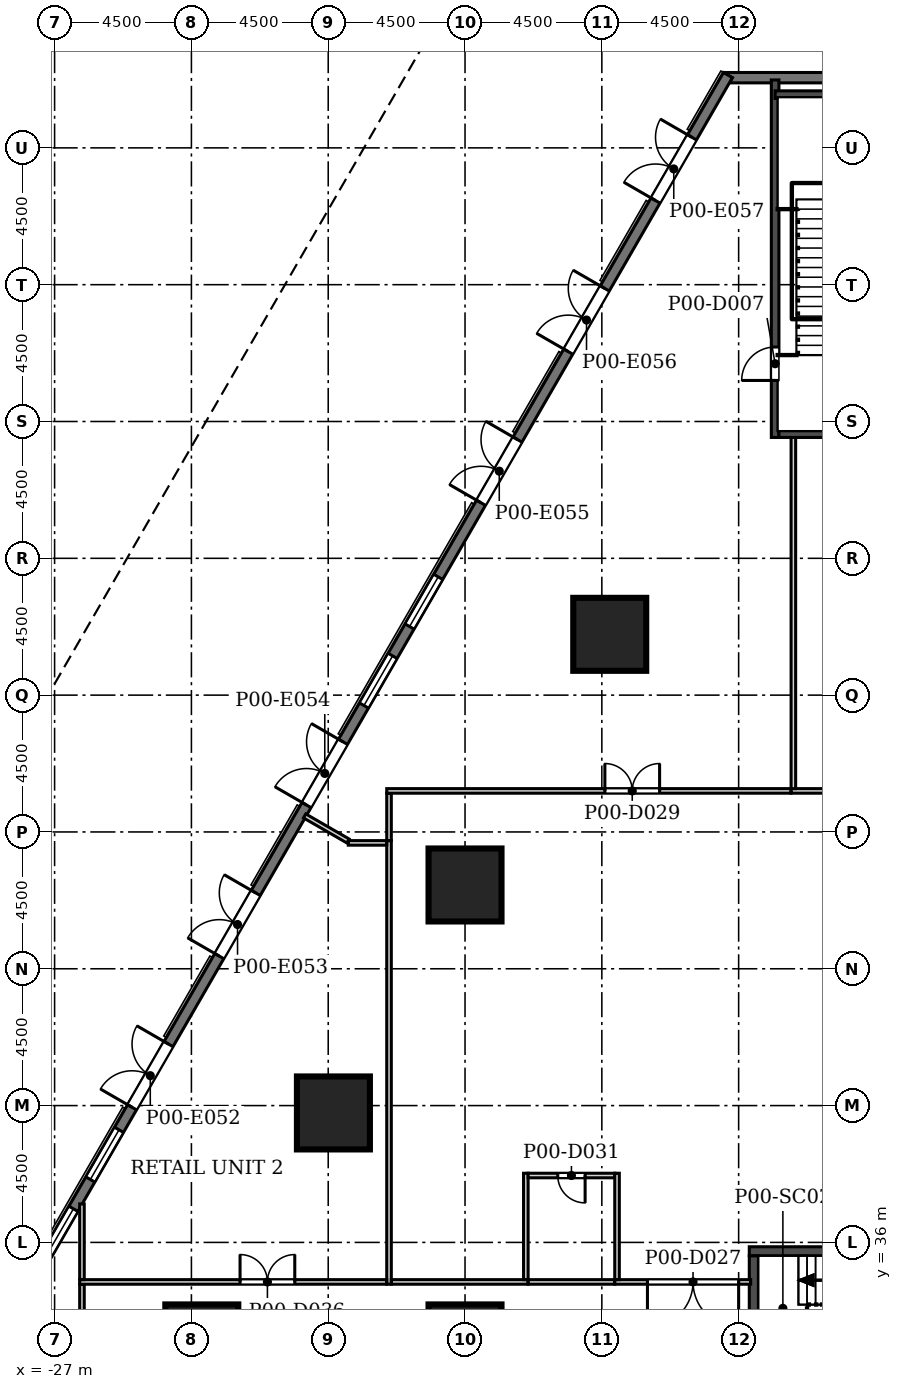
"""IFC4 building model, lengths in metres.
Left out: names, types, materials, properties, quantities, classifications, styles, units other than length and angle.
Written with IfcOpenShell. Run it as: python <this file> out.ifc"""

import sys

from ifc_helpers import new_model, si_unit, direction, frame, frame_2d, origin, origin_2d, place, context, subcontext, project, spatial, polyline, rectangle, outline, extrude, element, fill, save


model = new_model("IFC4")
c1 = context("Model", 3, precision=1e-05, world=origin(), true_north=direction((0.0, 1.0)))
c2 = subcontext(c1, "Body", "Model", "MODEL_VIEW")
j1 = project(units=[si_unit("LENGTHUNIT", "METRE"), si_unit("PLANEANGLEUNIT", "RADIAN")], contexts=[c1])
p1 = place(None, origin())
s1 = spatial("IfcSite", under=j1, at=p1, CompositionType="ELEMENT")
p2 = place(p1, origin())
s2 = spatial("IfcBuilding", under=s1, at=p2, CompositionType="ELEMENT")
p3 = place(p2, origin())
s3 = spatial("IfcBuildingStorey", under=s2, at=p3, CompositionType="ELEMENT", Elevation=0.0)
for number, where, z_axis, x_axis in (
    (1, (-8.74, 56.0, 0.0), (0.0, 0.0, 1.0), (1.0, 0.0, 0.0)),
    (2, (-22.158, 32.76, 0.0), (0.0, 0.0, 1.0), (1.0, 0.0, 0.0)),
    (3, (-13.5, 47.756, 0.0), (0.0, 0.0, 1.0), (1.0, 0.0, 0.0)),
    (4, (-13.5, 32.76, 0.0), (0.0, 0.0, 1.0), (1.0, 0.0, 0.0)),
    (5, (-17.829, 40.258, 0.0), (0.0, 0.0, 1.0), (1.0, 0.0, 0.0)),
):
    element("IfcColumn", number, at=place(p3, frame(where, z_axis=z_axis, x_axis=x_axis)), inside=s3, PredefinedType="COLUMN", context=c2, shape_type="SweptSolid", body=[
        extrude(rectangle(XDim=2.4, YDim=2.4, at=origin_2d()), origin(), (0.0, 0.0, 1.0), 8.0),
    ])
p4 = place(p3, origin())
e6 = element("IfcWall", 6, at=p4, inside=s3, PredefinedType="SOLIDWALL", context=c2, shape_type="SweptSolid", body=[
    extrude(outline(polyline([(5.001, 74.478), (4.706, 74.308), (4.805, 74.138), (-4.805, 74.138), (-4.706, 74.308), (-5.001, 74.478), (-5.001, 74.479), (5.001, 74.479), (5.001, 74.478)])), origin(), (0.0, 0.0, 1.0), 7.7),
])
p5 = place(p3, frame((-4.853, 74.393, 0.0), z_axis=(0.0, 0.0, 1.0), x_axis=(-0.499999725439, -0.866025562302, 0.0)))
e7 = element("IfcWall", 7, at=p5, inside=s3, PredefinedType="SOLIDWALL", context=c2, shape_type="SweptSolid", body=[
    extrude(rectangle(XDim=52.058, YDim=0.34, at=frame_2d((26.029, 0.0))), origin(), (0.0, 0.0, 1.0), 7.7),
])
p6 = place(p5, frame((19.058, 0.0, 0.9)))
e8 = element("IfcOpeningElement", 8, at=p6, cuts=e7, PredefinedType="OPENING", context=c2, shape_type="SweptSolid", body=[
    extrude(rectangle(XDim=1.885, YDim=3.5, at=frame_2d((0.942, 1.75))), frame((0.0, 0.18, 0.0), z_axis=(0.0, -1.0, 0.0), x_axis=(1.0, 0.0, 0.0)), (0.0, 0.0, 1.0), 0.36),
])
p7 = place(p5, frame((22.058, 0.0, 0.9)))
e9 = element("IfcOpeningElement", 9, at=p7, cuts=e7, PredefinedType="OPENING", context=c2, shape_type="SweptSolid", body=[
    extrude(rectangle(XDim=1.885, YDim=3.5, at=frame_2d((0.942, 1.75))), frame((0.0, 0.18, 0.0), z_axis=(0.0, -1.0, 0.0), x_axis=(1.0, 0.0, 0.0)), (0.0, 0.0, 1.0), 0.36),
])
p8 = place(p5, frame((40.058, 0.0, 0.9)))
e10 = element("IfcOpeningElement", 10, at=p8, cuts=e7, PredefinedType="OPENING", context=c2, shape_type="SweptSolid", body=[
    extrude(rectangle(XDim=1.885, YDim=3.5, at=frame_2d((0.942, 1.75))), frame((0.0, 0.18, 0.0), z_axis=(0.0, -1.0, 0.0), x_axis=(1.0, 0.0, 0.0)), (0.0, 0.0, 1.0), 0.36),
])
p9 = place(p5, frame((43.058, 0.0, 0.9)))
e11 = element("IfcOpeningElement", 11, at=p9, cuts=e7, PredefinedType="OPENING", context=c2, shape_type="SweptSolid", body=[
    extrude(rectangle(XDim=1.885, YDim=3.5, at=frame_2d((0.942, 1.75))), frame((0.0, 0.18, 0.0), z_axis=(0.0, -1.0, 0.0), x_axis=(1.0, 0.0, 0.0)), (0.0, 0.0, 1.0), 0.36),
])
p10 = place(p5, frame((48.279, 0.0, 0.0)))
e12 = element("IfcOpeningElement", 12, at=p10, cuts=e7, PredefinedType="OPENING", context=c2, shape_type="SweptSolid", body=[
    extrude(rectangle(XDim=2.4, YDim=2.7, at=frame_2d((1.2, 1.35))), frame((0.0, 0.18, 0.0), z_axis=(0.0, -1.0, 0.0), x_axis=(1.0, 0.0, 0.0)), (0.0, 0.0, 1.0), 0.36),
])
p11 = place(p5, frame((36.8, 0.0, 0.0)))
e13 = element("IfcOpeningElement", 13, at=p11, cuts=e7, PredefinedType="OPENING", context=c2, shape_type="SweptSolid", body=[
    extrude(rectangle(XDim=2.4, YDim=2.7, at=frame_2d((1.2, 1.35))), frame((0.0, 0.18, 0.0), z_axis=(0.0, -1.0, 0.0), x_axis=(1.0, 0.0, 0.0)), (0.0, 0.0, 1.0), 0.36),
])
p12 = place(p5, frame((31.06, 0.0, 0.0)))
e14 = element("IfcOpeningElement", 14, at=p12, cuts=e7, PredefinedType="OPENING", context=c2, shape_type="SweptSolid", body=[
    extrude(rectangle(XDim=2.4, YDim=2.7, at=frame_2d((1.2, 1.35))), frame((0.0, 0.18, 0.0), z_axis=(0.0, -1.0, 0.0), x_axis=(1.0, 0.0, 0.0)), (0.0, 0.0, 1.0), 0.36),
])
p13 = place(p5, frame((25.321, 0.0, 0.0)))
e15 = element("IfcOpeningElement", 15, at=p13, cuts=e7, PredefinedType="OPENING", context=c2, shape_type="SweptSolid", body=[
    extrude(rectangle(XDim=2.4, YDim=2.7, at=frame_2d((1.2, 1.35))), frame((0.0, 0.18, 0.0), z_axis=(0.0, -1.0, 0.0), x_axis=(1.0, 0.0, 0.0)), (0.0, 0.0, 1.0), 0.36),
])
p14 = place(p5, frame((13.842, 0.0, 0.0)))
e16 = element("IfcOpeningElement", 16, at=p14, cuts=e7, PredefinedType="OPENING", context=c2, shape_type="SweptSolid", body=[
    extrude(rectangle(XDim=2.4, YDim=2.7, at=frame_2d((1.2, 1.35))), frame((0.0, 0.18, 0.0), z_axis=(0.0, -1.0, 0.0), x_axis=(1.0, 0.0, 0.0)), (0.0, 0.0, 1.0), 0.36),
])
p15 = place(p5, frame((8.102, 0.0, 0.0)))
e17 = element("IfcOpeningElement", 17, at=p15, cuts=e7, PredefinedType="OPENING", context=c2, shape_type="SweptSolid", body=[
    extrude(rectangle(XDim=2.4, YDim=2.7, at=frame_2d((1.2, 1.35))), frame((0.0, 0.18, 0.0), z_axis=(0.0, -1.0, 0.0), x_axis=(1.0, 0.0, 0.0)), (0.0, 0.0, 1.0), 0.36),
])
p16 = place(p5, frame((2.363, 0.0, 0.0)))
e18 = element("IfcOpeningElement", 18, at=p16, cuts=e7, PredefinedType="OPENING", context=c2, shape_type="SweptSolid", body=[
    extrude(rectangle(XDim=2.4, YDim=2.7, at=frame_2d((1.2, 1.35))), frame((0.0, 0.18, 0.0), z_axis=(0.0, -1.0, 0.0), x_axis=(1.0, 0.0, 0.0)), (0.0, 0.0, 1.0), 0.36),
])
p17 = place(p3, frame((-4.15, 35.707, -0.4), z_axis=(0.0, 0.0, 1.0), x_axis=(1.0, 0.0, 0.0)))
e19 = element("IfcWall", 19, at=p17, inside=s3, PredefinedType="SOLIDWALL", context=c2, shape_type="SweptSolid", body=[
    extrude(rectangle(XDim=8.3, YDim=0.3, at=frame_2d((4.15, 0.0))), origin(), (0.0, 0.0, 1.0), 8.1),
])
p18 = place(p3, frame((-4.0, 29.057, -0.4), z_axis=(0.0, 0.0, 1.0), x_axis=(0.0, 1.0, 0.0)))
e20 = element("IfcWall", 20, at=p18, inside=s3, PredefinedType="SOLIDWALL", context=c2, shape_type="SweptSolid", body=[
    extrude(rectangle(XDim=6.5, YDim=0.3, at=frame_2d((3.25, 0.0))), origin(), (0.0, 0.0, 1.0), 8.1),
])
p19 = place(p3, frame((-26.1, 34.625, 0.0), z_axis=(0.0, 0.0, 1.0), x_axis=(0.0, -1.0, 0.0)))
e21 = element("IfcWall", 21, at=p19, inside=s3, PredefinedType="PARTITIONING", context=c2, shape_type="SweptSolid", body=[
    extrude(rectangle(XDim=5.1, YDim=0.15, at=frame_2d((2.55, 0.0))), origin(), (0.0, 0.0, 1.0), 7.7),
])
p20 = place(p3, frame((-16.0, 34.625, 0.0), z_axis=(0.0, 0.0, 1.0), x_axis=(0.0, 1.0, 0.0)))
e22 = element("IfcWall", 22, at=p20, inside=s3, PredefinedType="PARTITIONING", context=c2, shape_type="SweptSolid", body=[
    extrude(rectangle(XDim=14.59, YDim=0.15, at=frame_2d((7.295, 0.0))), origin(), (0.0, 0.0, 1.0), 7.7),
])
p21 = place(p3, frame((-16.075, 34.7, 0.0), z_axis=(0.0, 0.0, 1.0), x_axis=(-1.0, 0.0, 0.0)))
e23 = element("IfcWall", 23, at=p21, inside=s3, PredefinedType="PARTITIONING", context=c2, shape_type="SweptSolid", body=[
    extrude(rectangle(XDim=10.1, YDim=0.15, at=frame_2d((5.05, 0.0))), origin(), (0.0, 0.0, 1.0), 7.7),
])
p22 = place(p21, frame((3.025, 0.0, 0.0)))
e24 = element("IfcOpeningElement", 24, at=p22, cuts=e23, PredefinedType="OPENING", context=c2, shape_type="SweptSolid", body=[
    extrude(rectangle(XDim=1.8, YDim=2.1, at=frame_2d((0.9, 1.05))), frame((0.0, 0.085, 0.0), z_axis=(0.0, -1.0, 0.0), x_axis=(1.0, 0.0, 0.0)), (0.0, 0.0, 1.0), 0.17),
])
p23 = place(p3, frame((-11.425, 34.7, 0.0), z_axis=(0.0, 0.0, 1.0), x_axis=(-1.0, 0.0, 0.0)))
e25 = element("IfcWall", 25, at=p23, inside=s3, PredefinedType="PARTITIONING", context=c2, shape_type="SweptSolid", body=[
    extrude(rectangle(XDim=4.5, YDim=0.15, at=frame_2d((2.25, 0.0))), origin(), (0.0, 0.0, 1.0), 7.7),
])
p24 = place(p3, frame((-8.575, 34.7, 0.0), z_axis=(0.0, 0.0, 1.0), x_axis=(-1.0, 0.0, 0.0)))
e26 = element("IfcWall", 26, at=p24, inside=s3, PredefinedType="PARTITIONING", context=c2, shape_type="SweptSolid", body=[
    extrude(rectangle(XDim=2.85, YDim=0.15, at=frame_2d((1.425, 0.0))), origin(), (0.0, 0.0, 1.0), 7.7),
])
p25 = place(p3, frame((-4.105, 34.7, 0.0), z_axis=(0.0, 0.0, 1.0), x_axis=(-1.0, 0.0, 0.0)))
e27 = element("IfcWall", 27, at=p25, inside=s3, PredefinedType="PARTITIONING", context=c2, shape_type="SweptSolid", body=[
    extrude(rectangle(XDim=4.47, YDim=0.15, at=frame_2d((2.235, 0.0))), origin(), (0.0, 0.0, 1.0), 7.7),
])
p26 = place(p25, frame((0.395, 0.0, 0.0)))
e28 = element("IfcOpeningElement", 28, at=p26, cuts=e27, PredefinedType="OPENING", context=c2, shape_type="SweptSolid", body=[
    extrude(rectangle(XDim=3.0, YDim=2.4, at=frame_2d((1.5, 1.2))), frame((0.0, 0.085, 0.0), z_axis=(0.0, -1.0, 0.0), x_axis=(1.0, 0.0, 0.0)), (0.0, 0.0, 1.0), 0.17),
])
p27 = place(p3, frame((-11.5, 34.775, 0.0), z_axis=(0.0, 0.0, 1.0), x_axis=(0.0, 1.0, 0.0)))
e29 = element("IfcWall", 29, at=p27, inside=s3, PredefinedType="PARTITIONING", context=c2, shape_type="SweptSolid", body=[
    extrude(rectangle(XDim=3.5, YDim=0.15, at=frame_2d((1.75, 0.0))), origin(), (0.0, 0.0, 1.0), 7.7),
])
p28 = place(p3, frame((-26.1, 37.267, 0.0), z_axis=(0.0, 0.0, 1.0), x_axis=(0.0, -1.0, 0.0)))
e30 = element("IfcWall", 30, at=p28, inside=s3, PredefinedType="PARTITIONING", context=c2, shape_type="SweptSolid", body=[
    extrude(rectangle(XDim=2.492, YDim=0.15, at=frame_2d((1.246, 0.0))), origin(), (0.0, 0.0, 1.0), 7.7),
])
p29 = place(p3, frame((-11.425, 38.2, 0.0), z_axis=(0.0, 0.0, 1.0), x_axis=(1.0, 0.0, 0.0)))
e31 = element("IfcWall", 31, at=p29, inside=s3, PredefinedType="PARTITIONING", context=c2, shape_type="SweptSolid", body=[
    extrude(rectangle(XDim=2.85, YDim=0.15, at=frame_2d((1.425, 0.0))), origin(), (0.0, 0.0, 1.0), 7.7),
])
p30 = place(p29, frame((0.975, 0.0, 0.0)))
e32 = element("IfcOpeningElement", 32, at=p30, cuts=e31, PredefinedType="OPENING", context=c2, shape_type="SweptSolid", body=[
    extrude(rectangle(XDim=0.9, YDim=2.1, at=frame_2d((0.45, 1.05))), frame((0.0, 0.085, 0.0), z_axis=(0.0, -1.0, 0.0), x_axis=(1.0, 0.0, 0.0)), (0.0, 0.0, 1.0), 0.17),
])
p31 = place(p3, frame((-8.5, 38.275, 0.0), z_axis=(0.0, 0.0, 1.0), x_axis=(0.0, -1.0, 0.0)))
e33 = element("IfcWall", 33, at=p31, inside=s3, PredefinedType="PARTITIONING", context=c2, shape_type="SweptSolid", body=[
    extrude(rectangle(XDim=3.5, YDim=0.15, at=frame_2d((1.75, 0.0))), origin(), (0.0, 0.0, 1.0), 7.7),
])
p32 = place(p3, frame((-16.075, 49.14, 0.0), z_axis=(0.0, 0.0, 1.0), x_axis=(-1.0, 0.0, 0.0)))
e34 = element("IfcWall", 34, at=p32, inside=s3, PredefinedType="PARTITIONING", context=c2, shape_type="SweptSolid", body=[
    extrude(rectangle(XDim=1.265, YDim=0.15, at=frame_2d((0.633, 0.0))), origin(), (0.0, 0.0, 1.0), 7.7),
])
p33 = place(p3, frame((-17.35, 49.203, 0.0), z_axis=(0.0, 0.0, 1.0), x_axis=(-0.865825124288, 0.500346733926, 0.0)))
e35 = element("IfcWall", 35, at=p33, inside=s3, PredefinedType="PARTITIONING", context=c2, shape_type="SweptSolid", body=[
    extrude(rectangle(XDim=1.647, YDim=0.15, at=frame_2d((0.824, 0.0))), origin(), (0.0, 0.0, 1.0), 7.7),
])
p34 = place(p3, frame((-16.0, 49.215, 0.0), z_axis=(0.0, 0.0, 1.0), x_axis=(0.0, 1.0, 0.0)))
e36 = element("IfcWall", 36, at=p34, inside=s3, PredefinedType="PARTITIONING", context=c2, shape_type="SweptSolid", body=[
    extrude(rectangle(XDim=1.56, YDim=0.15, at=frame_2d((0.78, 0.0))), origin(), (0.0, 0.0, 1.0), 7.7),
])
p35 = place(p3, frame((-16.075, 50.85, 0.0), z_axis=(0.0, 0.0, 1.0), x_axis=(1.0, 0.0, 0.0)))
e37 = element("IfcWall", 37, at=p35, inside=s3, PredefinedType="PARTITIONING", context=c2, shape_type="SweptSolid", body=[
    extrude(rectangle(XDim=13.3, YDim=0.15, at=frame_2d((6.65, 0.0))), origin(), (0.0, 0.0, 1.0), 7.7),
])
p36 = place(p35, frame((7.175, 0.0, 0.0)))
e38 = element("IfcOpeningElement", 38, at=p36, cuts=e37, PredefinedType="OPENING", context=c2, shape_type="SweptSolid", body=[
    extrude(rectangle(XDim=1.8, YDim=2.1, at=frame_2d((0.9, 1.05))), frame((0.0, 0.085, 0.0), z_axis=(0.0, -1.0, 0.0), x_axis=(1.0, 0.0, 0.0)), (0.0, 0.0, 1.0), 0.17),
])
p37 = place(p3, frame((-2.775, 50.85, 0.0), z_axis=(0.0, 0.0, 1.0), x_axis=(1.0, 0.0, 0.0)))
e39 = element("IfcWall", 39, at=p37, inside=s3, PredefinedType="PARTITIONING", context=c2, shape_type="SweptSolid", body=[
    extrude(rectangle(XDim=18.675, YDim=0.15, at=frame_2d((9.337, 0.0))), origin(), (0.0, 0.0, 1.0), 7.7),
])
p38 = place(p37, frame((8.875, 0.0, 0.0)))
e40 = element("IfcOpeningElement", 40, at=p38, cuts=e39, PredefinedType="OPENING", context=c2, shape_type="SweptSolid", body=[
    extrude(rectangle(XDim=1.8, YDim=2.1, at=frame_2d((0.9, 1.05))), frame((0.0, 0.085, 0.0), z_axis=(0.0, -1.0, 0.0), x_axis=(1.0, 0.0, 0.0)), (0.0, 0.0, 1.0), 0.17),
])
p39 = place(p3, frame((-3.3, 62.475, 0.0), z_axis=(0.0, 0.0, 1.0), x_axis=(0.0, 1.0, 0.0)))
e41 = element("IfcWall", 41, at=p39, inside=s3, PredefinedType="SOLIDWALL", context=c2, shape_type="SweptSolid", body=[
    extrude(rectangle(XDim=11.758, YDim=0.25, at=frame_2d((5.879, 0.0))), origin(), (0.0, 0.0, 1.0), 7.7),
])
p40 = place(p39, frame((1.875, 0.0, 0.0)))
e42 = element("IfcOpeningElement", 42, at=p40, cuts=e41, PredefinedType="OPENING", context=c2, shape_type="SweptSolid", body=[
    extrude(rectangle(XDim=1.1, YDim=2.1, at=frame_2d((0.55, 1.05))), frame((0.0, 0.135, 0.0), z_axis=(0.0, -1.0, 0.0), x_axis=(1.0, 0.0, 0.0)), (0.0, 0.0, 1.0), 0.27),
])
p41 = place(p3, frame((-2.7, 62.475, 0.0), z_axis=(0.0, 0.0, 1.0), x_axis=(0.0, -1.0, 0.0)))
e43 = element("IfcWall", 43, at=p41, inside=s3, PredefinedType="PARTITIONING", context=c2, shape_type="SweptSolid", body=[
    extrude(rectangle(XDim=11.55, YDim=0.15, at=frame_2d((5.775, 0.0))), origin(), (0.0, 0.0, 1.0), 7.7),
])
p42 = place(p3, frame((3.175, 62.6, 0.0), z_axis=(0.0, 0.0, 1.0), x_axis=(-1.0, 0.0, 0.0)))
e44 = element("IfcWall", 44, at=p42, inside=s3, PredefinedType="SOLIDWALL", context=c2, shape_type="SweptSolid", body=[
    extrude(rectangle(XDim=6.35, YDim=0.25, at=frame_2d((3.175, 0.0))), origin(), (0.0, 0.0, 1.0), 7.7),
])
p43 = place(p3, frame((-3.3, 73.75, 0.0), z_axis=(0.0, 0.0, 1.0), x_axis=(1.0, 0.0, 0.0)))
e45 = element("IfcWall", 45, at=p43, inside=s3, PredefinedType="SOLIDWALL", context=c2, shape_type="SweptSolid", body=[
    extrude(rectangle(XDim=6.6, YDim=0.25, at=frame_2d((3.3, 0.0))), origin(), (0.0, 0.0, 1.0), 7.7),
])
p44 = place(p6, origin())
e46 = element("IfcWindow", 46, at=p44, inside=s3, PartitioningType="SINGLE_PANEL", PredefinedType="WINDOW", context=c2, shape_type="SweptSolid", body=[
    extrude(rectangle(XDim=1.885, YDim=3.5, at=frame_2d((0.942, 1.75))), frame((0.0, 0.11, 0.0), z_axis=(0.0, -1.0, 0.0), x_axis=(1.0, 0.0, 0.0)), (0.0, 0.0, 1.0), 0.06),
])
fill(e8, e46)
p45 = place(p7, origin())
e47 = element("IfcWindow", 47, at=p45, inside=s3, PartitioningType="SINGLE_PANEL", PredefinedType="WINDOW", context=c2, shape_type="SweptSolid", body=[
    extrude(rectangle(XDim=1.885, YDim=3.5, at=frame_2d((0.942, 1.75))), frame((0.0, 0.11, 0.0), z_axis=(0.0, -1.0, 0.0), x_axis=(1.0, 0.0, 0.0)), (0.0, 0.0, 1.0), 0.06),
])
fill(e9, e47)
p46 = place(p8, origin())
e48 = element("IfcWindow", 48, at=p46, inside=s3, PartitioningType="SINGLE_PANEL", PredefinedType="WINDOW", context=c2, shape_type="SweptSolid", body=[
    extrude(rectangle(XDim=1.885, YDim=3.5, at=frame_2d((0.942, 1.75))), frame((0.0, 0.11, 0.0), z_axis=(0.0, -1.0, 0.0), x_axis=(1.0, 0.0, 0.0)), (0.0, 0.0, 1.0), 0.06),
])
fill(e10, e48)
p47 = place(p9, origin())
e49 = element("IfcWindow", 49, at=p47, inside=s3, PartitioningType="SINGLE_PANEL", PredefinedType="WINDOW", context=c2, shape_type="SweptSolid", body=[
    extrude(rectangle(XDim=1.885, YDim=3.5, at=frame_2d((0.942, 1.75))), frame((0.0, 0.11, 0.0), z_axis=(0.0, -1.0, 0.0), x_axis=(1.0, 0.0, 0.0)), (0.0, 0.0, 1.0), 0.06),
])
fill(e11, e49)
p48 = place(p11, frame((2.4, 0.0, 0.0), z_axis=(0.0, 0.0, 1.0), x_axis=(-1.0, 0.0, 0.0)))
e50 = element("IfcDoor", 50, at=p48, inside=s3, OperationType="DOUBLE_DOOR_SINGLE_SWING", PredefinedType="DOOR", context=c2, shape_type="SweptSolid", body=[
    extrude(rectangle(XDim=2.4, YDim=2.7, at=frame_2d((1.2, 1.35))), frame((0.0, 0.025, 0.0), z_axis=(0.0, -1.0, 0.0), x_axis=(1.0, 0.0, 0.0)), (0.0, 0.0, 1.0), 0.05),
])
fill(e13, e50)
p49 = place(p12, frame((2.4, 0.0, 0.0), z_axis=(0.0, 0.0, 1.0), x_axis=(-1.0, 0.0, 0.0)))
e51 = element("IfcDoor", 51, at=p49, inside=s3, OperationType="DOUBLE_DOOR_SINGLE_SWING", PredefinedType="DOOR", context=c2, shape_type="SweptSolid", body=[
    extrude(rectangle(XDim=2.4, YDim=2.7, at=frame_2d((1.2, 1.35))), frame((0.0, 0.025, 0.0), z_axis=(0.0, -1.0, 0.0), x_axis=(1.0, 0.0, 0.0)), (0.0, 0.0, 1.0), 0.05),
])
fill(e14, e51)
p50 = place(p13, frame((2.4, 0.0, 0.0), z_axis=(0.0, 0.0, 1.0), x_axis=(-1.0, 0.0, 0.0)))
e52 = element("IfcDoor", 52, at=p50, inside=s3, OperationType="DOUBLE_DOOR_SINGLE_SWING", PredefinedType="DOOR", context=c2, shape_type="SweptSolid", body=[
    extrude(rectangle(XDim=2.4, YDim=2.7, at=frame_2d((1.2, 1.35))), frame((0.0, 0.025, 0.0), z_axis=(0.0, -1.0, 0.0), x_axis=(1.0, 0.0, 0.0)), (0.0, 0.0, 1.0), 0.05),
])
fill(e15, e52)
p51 = place(p14, frame((2.4, 0.0, 0.0), z_axis=(0.0, 0.0, 1.0), x_axis=(-1.0, 0.0, 0.0)))
e53 = element("IfcDoor", 53, at=p51, inside=s3, OperationType="DOUBLE_DOOR_SINGLE_SWING", PredefinedType="DOOR", context=c2, shape_type="SweptSolid", body=[
    extrude(rectangle(XDim=2.4, YDim=2.7, at=frame_2d((1.2, 1.35))), frame((0.0, 0.025, 0.0), z_axis=(0.0, -1.0, 0.0), x_axis=(1.0, 0.0, 0.0)), (0.0, 0.0, 1.0), 0.05),
])
fill(e16, e53)
p52 = place(p15, frame((2.4, 0.0, 0.0), z_axis=(0.0, 0.0, 1.0), x_axis=(-1.0, 0.0, 0.0)))
e54 = element("IfcDoor", 54, at=p52, inside=s3, OperationType="DOUBLE_DOOR_SINGLE_SWING", PredefinedType="DOOR", context=c2, shape_type="SweptSolid", body=[
    extrude(rectangle(XDim=2.4, YDim=2.7, at=frame_2d((1.2, 1.35))), frame((0.0, 0.025, 0.0), z_axis=(0.0, -1.0, 0.0), x_axis=(1.0, 0.0, 0.0)), (0.0, 0.0, 1.0), 0.05),
])
fill(e17, e54)
p53 = place(p16, frame((2.4, 0.0, 0.0), z_axis=(0.0, 0.0, 1.0), x_axis=(-1.0, 0.0, 0.0)))
e55 = element("IfcDoor", 55, at=p53, inside=s3, OperationType="DOUBLE_DOOR_SINGLE_SWING", PredefinedType="DOOR", context=c2, shape_type="SweptSolid", body=[
    extrude(rectangle(XDim=2.4, YDim=2.7, at=frame_2d((1.2, 1.35))), frame((0.0, 0.025, 0.0), z_axis=(0.0, -1.0, 0.0), x_axis=(1.0, 0.0, 0.0)), (0.0, 0.0, 1.0), 0.05),
])
fill(e18, e55)
p54 = place(p40, origin())
e56 = element("IfcDoor", 56, at=p54, inside=s3, OperationType="SINGLE_SWING_LEFT", PredefinedType="DOOR", context=c2, shape_type="SweptSolid", body=[
    extrude(rectangle(XDim=1.1, YDim=2.1, at=frame_2d((0.55, 1.05))), frame((0.0, 0.025, 0.0), z_axis=(0.0, -1.0, 0.0), x_axis=(1.0, 0.0, 0.0)), (0.0, 0.0, 1.0), 0.05),
])
fill(e42, e56)
p55 = place(p26, origin())
e57 = element("IfcDoor", 57, at=p55, inside=s3, OperationType="DOUBLE_DOOR_SINGLE_SWING", PredefinedType="DOOR", context=c2, shape_type="SweptSolid", body=[
    extrude(rectangle(XDim=3.0, YDim=2.4, at=frame_2d((1.5, 1.2))), frame((0.0, 0.025, 0.0), z_axis=(0.0, -1.0, 0.0), x_axis=(1.0, 0.0, 0.0)), (0.0, 0.0, 1.0), 0.05),
])
fill(e28, e57)
p56 = place(p36, origin())
e58 = element("IfcDoor", 58, at=p56, inside=s3, OperationType="DOUBLE_DOOR_SINGLE_SWING", PredefinedType="DOOR", context=c2, shape_type="SweptSolid", body=[
    extrude(rectangle(XDim=1.8, YDim=2.1, at=frame_2d((0.9, 1.05))), frame((0.0, 0.025, 0.0), z_axis=(0.0, -1.0, 0.0), x_axis=(1.0, 0.0, 0.0)), (0.0, 0.0, 1.0), 0.05),
])
fill(e38, e58)
p57 = place(p30, frame((0.9, 0.0, 0.0), z_axis=(0.0, 0.0, 1.0), x_axis=(-1.0, 0.0, 0.0)))
e59 = element("IfcDoor", 59, at=p57, inside=s3, OperationType="SINGLE_SWING_LEFT", PredefinedType="DOOR", context=c2, shape_type="SweptSolid", body=[
    extrude(rectangle(XDim=0.9, YDim=2.1, at=frame_2d((0.45, 1.05))), frame((0.0, 0.025, 0.0), z_axis=(0.0, -1.0, 0.0), x_axis=(1.0, 0.0, 0.0)), (0.0, 0.0, 1.0), 0.05),
])
fill(e32, e59)
p58 = place(p22, frame((1.8, 0.0, 0.0), z_axis=(0.0, 0.0, 1.0), x_axis=(-1.0, 0.0, 0.0)))
e60 = element("IfcDoor", 60, at=p58, inside=s3, OperationType="DOUBLE_DOOR_SINGLE_SWING", PredefinedType="DOOR", context=c2, shape_type="SweptSolid", body=[
    extrude(rectangle(XDim=1.8, YDim=2.1, at=frame_2d((0.9, 1.05))), frame((0.0, 0.025, 0.0), z_axis=(0.0, -1.0, 0.0), x_axis=(1.0, 0.0, 0.0)), (0.0, 0.0, 1.0), 0.05),
])
fill(e24, e60)
save(model, sys.argv[1])
